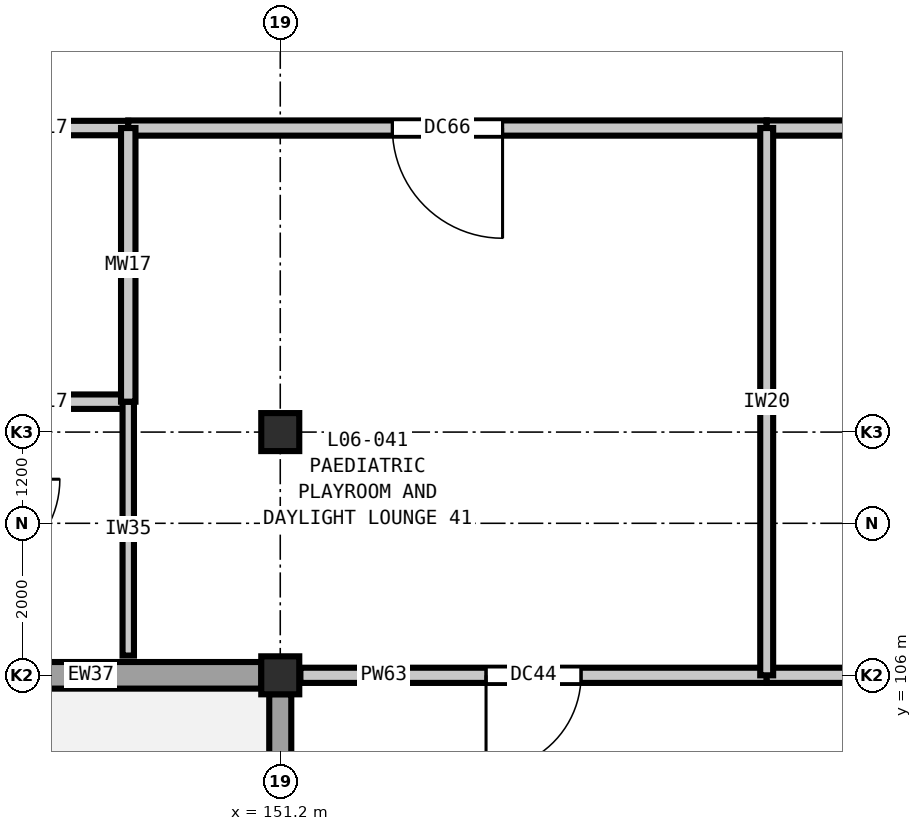
"""IFC4 building model, lengths in metres.
Left out: names, types, materials, properties, quantities, classifications, styles, units other than length and angle.
Written with IfcOpenShell. Run it as: python <this file> out.ifc"""

import sys

from ifc_helpers import new_model, si_unit, direction, frame, frame_2d, origin, origin_2d, place, context, subcontext, project, spatial, rectangle, extrude, element, fill, save


model = new_model("IFC4")
c1 = context("Model", 3, precision=1e-05, world=origin(), true_north=direction((0.0, 1.0)))
c2 = subcontext(c1, "Body", "Model", "MODEL_VIEW")
j1 = project(units=[si_unit("LENGTHUNIT", "METRE"), si_unit("PLANEANGLEUNIT", "RADIAN")], contexts=[c1])
p1 = place(None, origin())
s1 = spatial("IfcSite", under=j1, at=p1, CompositionType="ELEMENT")
p2 = place(p1, origin())
s2 = spatial("IfcBuilding", under=s1, at=p2, CompositionType="ELEMENT")
p3 = place(p2, frame((0.0, 0.0, 28.8)))
s3 = spatial("IfcBuildingStorey", under=s2, at=p3, CompositionType="ELEMENT", Elevation=28.8)
for number, where, z_axis, x_axis in (
    (1, (151.2, 106.0, 0.0), (0.0, 0.0, 1.0), (1.0, 0.0, 0.0)),
    (2, (151.2, 109.2, 0.0), (0.0, 0.0, 1.0), (1.0, 0.0, 0.0)),
):
    element("IfcColumn", number, at=place(p3, frame(where, z_axis=z_axis, x_axis=x_axis)), inside=s3, PredefinedType="COLUMN", context=c2, shape_type="SweptSolid", body=[
        extrude(rectangle(XDim=0.5, YDim=0.5, at=origin_2d()), origin(), (0.0, 0.0, 1.0), 4.2),
    ])
p4 = place(p3, frame((150.952, 106.0, 0.0), z_axis=(0.0, 0.0, 1.0), x_axis=(-1.0, 0.0, 0.0)))
e3 = element("IfcWall", 3, at=p4, inside=s3, PredefinedType="SOLIDWALL", context=c2, shape_type="SweptSolid", body=[
    extrude(rectangle(XDim=7.904, YDim=0.35, at=frame_2d((3.952, 0.0))), origin(), (0.0, 0.0, 1.0), 3.48),
])
p5 = place(p4, frame((4.737, 0.0, 0.9)))
e4 = element("IfcOpeningElement", 4, at=p5, cuts=e3, PredefinedType="OPENING", context=c2, shape_type="SweptSolid", body=[
    extrude(rectangle(XDim=1.05, YDim=1.4, at=frame_2d((0.525, 0.7))), frame((0.0, 0.185, 0.0), z_axis=(0.0, -1.0, 0.0), x_axis=(1.0, 0.0, 0.0)), (0.0, 0.0, 1.0), 0.37),
])
p6 = place(p3, frame((151.2, 103.048, 0.0), z_axis=(0.0, 0.0, 1.0), x_axis=(0.0, 1.0, 0.0)))
e5 = element("IfcWall", 5, at=p6, inside=s3, PredefinedType="SOLIDWALL", context=c2, shape_type="SweptSolid", body=[
    extrude(rectangle(XDim=2.704, YDim=0.29, at=frame_2d((1.352, 0.0))), origin(), (0.0, 0.0, 1.0), 3.48),
])
p7 = place(p6, frame((0.852, 0.0, 0.9)))
e6 = element("IfcOpeningElement", 6, at=p7, cuts=e5, PredefinedType="OPENING", context=c2, shape_type="SweptSolid", body=[
    extrude(rectangle(XDim=1.0, YDim=1.55, at=frame_2d((0.5, 0.775))), frame((0.0, 0.155, 0.0), z_axis=(0.0, -1.0, 0.0), x_axis=(1.0, 0.0, 0.0)), (0.0, 0.0, 1.0), 0.31),
])
p8 = place(p3, frame((151.465, 106.0, 0.0), z_axis=(0.0, 0.0, 1.0), x_axis=(1.0, 0.0, 0.0)))
e7 = element("IfcWall", 7, at=p8, inside=s3, PredefinedType="PARTITIONING", context=c2, shape_type="SweptSolid", body=[
    extrude(rectangle(XDim=6.135, YDim=0.2, at=frame_2d((3.067, 0.0))), origin(), (0.0, 0.0, 1.0), 3.635),
])
p9 = place(p8, frame((2.442, 0.0, 0.0)))
e8 = element("IfcOpeningElement", 8, at=p9, cuts=e7, PredefinedType="OPENING", context=c2, shape_type="SweptSolid", body=[
    extrude(rectangle(XDim=1.25, YDim=2.15, at=frame_2d((0.625, 1.075))), frame((0.0, 0.11, 0.0), z_axis=(0.0, -1.0, 0.0), x_axis=(1.0, 0.0, 0.0)), (0.0, 0.0, 1.0), 0.22),
])
p10 = place(p3, frame((157.6, 106.0, 0.0), z_axis=(0.0, 0.0, 1.0), x_axis=(1.0, 0.0, 0.0)))
e9 = element("IfcWall", 9, at=p10, inside=s3, PredefinedType="PARTITIONING", context=c2, shape_type="SweptSolid", body=[
    extrude(rectangle(XDim=1.735, YDim=0.2, at=frame_2d((0.867, 0.0))), origin(), (0.0, 0.0, 1.0), 3.635),
])
for number, where, z_axis, x_axis in (
    (10, (147.0, 109.6, 0.0), (0.0, 0.0, 1.0), (1.0, 0.0, 0.0)),
    (11, (147.0, 113.2, 0.0), (0.0, 0.0, 1.0), (1.0, 0.0, 0.0)),
):
    element("IfcWall", number, at=place(p3, frame(where, z_axis=z_axis, x_axis=x_axis)), inside=s3, PredefinedType="PLUMBINGWALL", context=c2, shape_type="SweptSolid", body=[
        extrude(rectangle(XDim=2.2, YDim=0.19, at=frame_2d((1.1, 0.0))), origin(), (0.0, 0.0, 1.0), 3.92),
    ])
p11 = place(p3, frame((149.2, 113.2, 0.0), z_axis=(0.0, 0.0, 1.0), x_axis=(1.0, 0.0, 0.0)))
e12 = element("IfcWall", 12, at=p11, inside=s3, PredefinedType="PARTITIONING", context=c2, shape_type="SweptSolid", body=[
    extrude(rectangle(XDim=8.4, YDim=0.2, at=frame_2d((4.2, 0.0))), origin(), (0.0, 0.0, 1.0), 3.92),
])
p12 = place(p11, frame((3.475, 0.0, 0.0)))
e13 = element("IfcOpeningElement", 13, at=p12, cuts=e12, PredefinedType="OPENING", context=c2, shape_type="SweptSolid", body=[
    extrude(rectangle(XDim=1.45, YDim=2.25, at=frame_2d((0.725, 1.125))), frame((0.0, 0.11, 0.0), z_axis=(0.0, -1.0, 0.0), x_axis=(1.0, 0.0, 0.0)), (0.0, 0.0, 1.0), 0.22),
])
p13 = place(p3, frame((157.6, 113.2, 0.0), z_axis=(0.0, 0.0, 1.0), x_axis=(1.0, 0.0, 0.0)))
e14 = element("IfcWall", 14, at=p13, inside=s3, PredefinedType="PARTITIONING", context=c2, shape_type="SweptSolid", body=[
    extrude(rectangle(XDim=9.2, YDim=0.2, at=frame_2d((4.6, 0.0))), origin(), (0.0, 0.0, 1.0), 3.92),
])
p14 = place(p13, frame((3.825, 0.0, 0.0)))
e15 = element("IfcOpeningElement", 15, at=p14, cuts=e14, PredefinedType="OPENING", context=c2, shape_type="SweptSolid", body=[
    extrude(rectangle(XDim=1.55, YDim=2.25, at=frame_2d((0.775, 1.125))), frame((0.0, 0.11, 0.0), z_axis=(0.0, -1.0, 0.0), x_axis=(1.0, 0.0, 0.0)), (0.0, 0.0, 1.0), 0.22),
])
p15 = place(p3, frame((149.2, 106.26, 0.0), z_axis=(0.0, 0.0, 1.0), x_axis=(0.0, 1.0, 0.0)))
e16 = element("IfcWall", 16, at=p15, inside=s3, PredefinedType="PARTITIONING", context=c2, shape_type="SweptSolid", body=[
    extrude(rectangle(XDim=3.34, YDim=0.15, at=frame_2d((1.67, 0.0))), origin(), (0.0, 0.0, 1.0), 3.92),
])
p16 = place(p3, frame((149.2, 109.6, 0.0), z_axis=(0.0, 0.0, 1.0), x_axis=(0.0, 1.0, 0.0)))
e17 = element("IfcWall", 17, at=p16, inside=s3, PredefinedType="PLUMBINGWALL", context=c2, shape_type="SweptSolid", body=[
    extrude(rectangle(XDim=3.6, YDim=0.19, at=frame_2d((1.8, 0.0))), origin(), (0.0, 0.0, 1.0), 3.92),
])
p17 = place(p3, frame((157.6, 106.0, 0.0), z_axis=(0.0, 0.0, 1.0), x_axis=(0.0, 1.0, 0.0)))
e18 = element("IfcWall", 18, at=p17, inside=s3, PredefinedType="PARTITIONING", context=c2, shape_type="SweptSolid", body=[
    extrude(rectangle(XDim=7.2, YDim=0.17, at=frame_2d((3.6, 0.0))), origin(), (0.0, 0.0, 1.0), 3.92),
])
p18 = place(p9, frame((1.25, 0.0, 0.0), z_axis=(0.0, 0.0, 1.0), x_axis=(-1.0, 0.0, 0.0)))
e19 = element("IfcDoor", 19, at=p18, inside=s3, OperationType="SINGLE_SWING_RIGHT", PredefinedType="DOOR", context=c2, shape_type="SweptSolid", body=[
    extrude(rectangle(XDim=1.25, YDim=2.15, at=frame_2d((0.625, 1.075))), frame((0.0, 0.025, 0.0), z_axis=(0.0, -1.0, 0.0), x_axis=(1.0, 0.0, 0.0)), (0.0, 0.0, 1.0), 0.05),
])
fill(e8, e19)
p19 = place(p12, frame((1.45, 0.0, 0.0), z_axis=(0.0, 0.0, 1.0), x_axis=(-1.0, 0.0, 0.0)))
e20 = element("IfcDoor", 20, at=p19, inside=s3, OperationType="SINGLE_SWING_LEFT", PredefinedType="DOOR", context=c2, shape_type="SweptSolid", body=[
    extrude(rectangle(XDim=1.45, YDim=2.25, at=frame_2d((0.725, 1.125))), frame((0.0, 0.025, 0.0), z_axis=(0.0, -1.0, 0.0), x_axis=(1.0, 0.0, 0.0)), (0.0, 0.0, 1.0), 0.05),
])
fill(e13, e20)
save(model, sys.argv[1])
